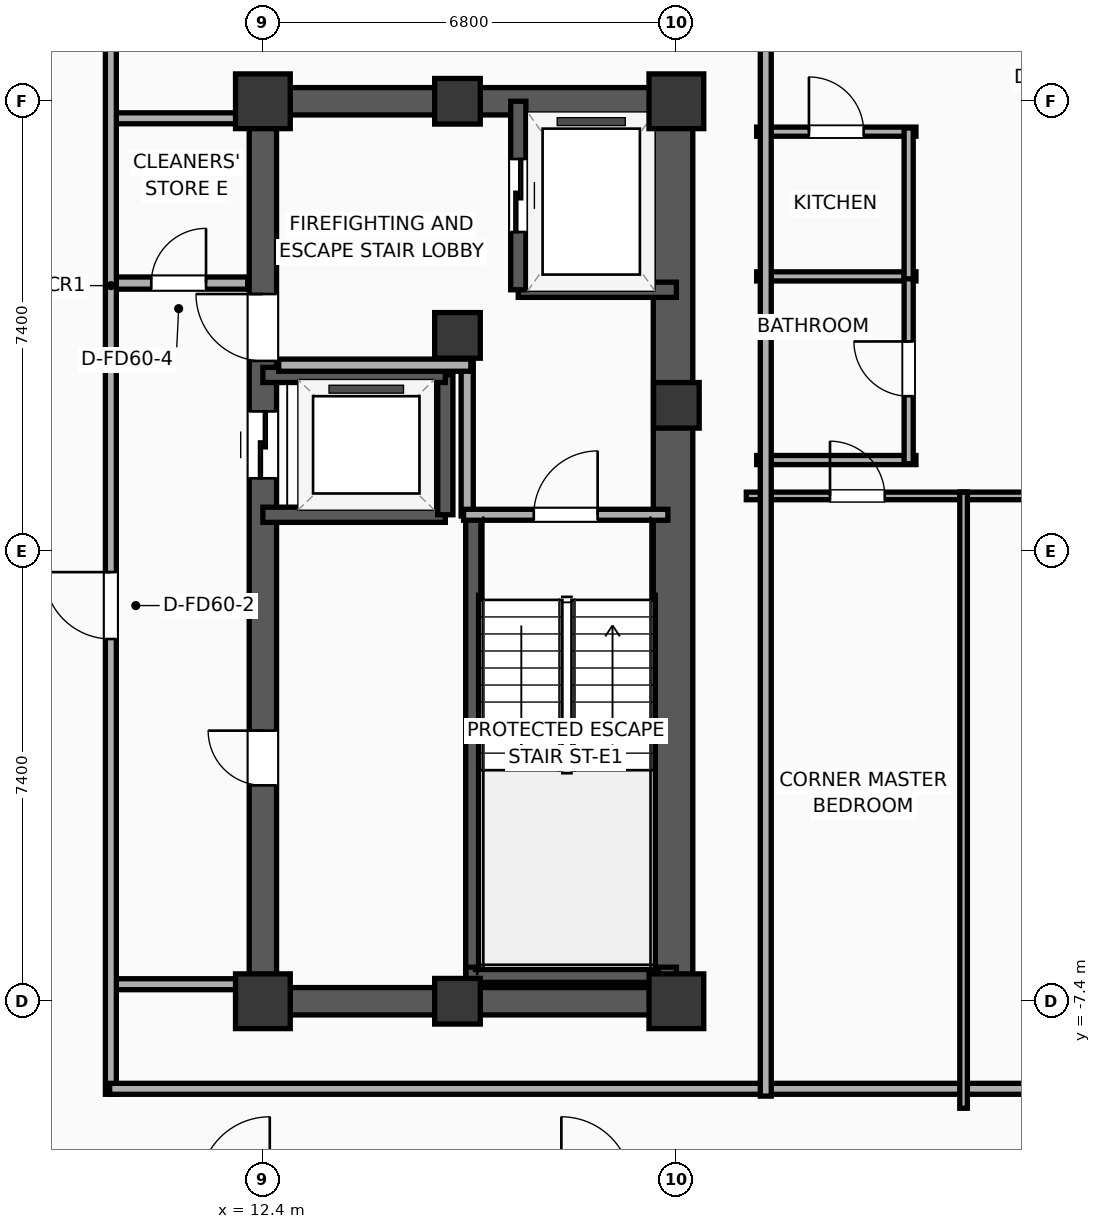
"""IFC4 building model, lengths in metres.
Left out: names, types, materials, properties, quantities, classifications, styles, units other than length and angle.
Written with IfcOpenShell. Run it as: python <this file> out.ifc"""

import sys

from ifc_helpers import new_model, si_unit, direction, frame, frame_2d, origin, origin_2d, place, context, subcontext, project, spatial, rectangle, extrude, element, fill, save


model = new_model("IFC4")
c1 = context("Model", 3, precision=1e-05, world=origin(), true_north=direction((0.0, 1.0)))
c2 = subcontext(c1, "Body", "Model", "MODEL_VIEW")
j1 = project(units=[si_unit("LENGTHUNIT", "METRE"), si_unit("PLANEANGLEUNIT", "RADIAN")], contexts=[c1])
p1 = place(None, origin())
s1 = spatial("IfcSite", under=j1, at=p1, CompositionType="ELEMENT")
p2 = place(p1, origin())
s2 = spatial("IfcBuilding", under=s1, at=p2, CompositionType="ELEMENT")
p3 = place(p2, frame((0.0, 0.0, 227.5)))
s3 = spatial("IfcBuildingStorey", under=s2, at=p3, CompositionType="ELEMENT", Elevation=227.5)
p4 = place(p3, frame((12.4, -7.4, 0.0), z_axis=(0.0, 0.0, 1.0), x_axis=(1.0, 0.0, 0.0)))
e1 = element("IfcColumn", 1, at=p4, inside=s3, PredefinedType="COLUMN", context=c2, shape_type="SweptSolid", body=[
    extrude(rectangle(XDim=0.9, YDim=0.9, at=origin_2d()), origin(), (0.0, 0.0, 1.0), 3.9),
])
p5 = place(p3, frame((15.6, 3.55, 0.0), z_axis=(0.0, 0.0, 1.0), x_axis=(1.0, 0.0, 0.0)))
e2 = element("IfcColumn", 2, at=p5, inside=s3, PredefinedType="COLUMN", context=c2, shape_type="SweptSolid", body=[
    extrude(rectangle(XDim=0.75, YDim=0.75, at=origin_2d()), origin(), (0.0, 0.0, 1.0), 3.9),
])
p6 = place(p3, frame((12.4, 7.4, 0.0), z_axis=(0.0, 0.0, 1.0), x_axis=(1.0, 0.0, 0.0)))
e3 = element("IfcColumn", 3, at=p6, inside=s3, PredefinedType="COLUMN", context=c2, shape_type="SweptSolid", body=[
    extrude(rectangle(XDim=0.9, YDim=0.9, at=origin_2d()), origin(), (0.0, 0.0, 1.0), 3.9),
])
for number, where, z_axis, x_axis in (
    (4, (15.6, -7.4, 0.0), (0.0, 0.0, 1.0), (1.0, 0.0, 0.0)),
    (5, (15.6, 7.4, 0.0), (0.0, 0.0, 1.0), (1.0, 0.0, 0.0)),
):
    element("IfcColumn", number, at=place(p3, frame(where, z_axis=z_axis, x_axis=x_axis)), inside=s3, PredefinedType="COLUMN", context=c2, shape_type="SweptSolid", body=[
        extrude(rectangle(XDim=0.75, YDim=0.75, at=origin_2d()), origin(), (0.0, 0.0, 1.0), 3.9),
    ])
p7 = place(p3, frame((19.2, -7.4, 0.0), z_axis=(0.0, 0.0, 1.0), x_axis=(1.0, 0.0, 0.0)))
e6 = element("IfcColumn", 6, at=p7, inside=s3, PredefinedType="COLUMN", context=c2, shape_type="SweptSolid", body=[
    extrude(rectangle(XDim=0.9, YDim=0.9, at=origin_2d()), origin(), (0.0, 0.0, 1.0), 3.9),
])
p8 = place(p3, frame((19.2, 2.4, 0.0), z_axis=(0.0, 0.0, 1.0), x_axis=(1.0, 0.0, 0.0)))
e7 = element("IfcColumn", 7, at=p8, inside=s3, PredefinedType="COLUMN", context=c2, shape_type="SweptSolid", body=[
    extrude(rectangle(XDim=0.75, YDim=0.75, at=origin_2d()), origin(), (0.0, 0.0, 1.0), 3.9),
])
p9 = place(p3, frame((19.2, 7.4, 0.0), z_axis=(0.0, 0.0, 1.0), x_axis=(1.0, 0.0, 0.0)))
e8 = element("IfcColumn", 8, at=p9, inside=s3, PredefinedType="COLUMN", context=c2, shape_type="SweptSolid", body=[
    extrude(rectangle(XDim=0.9, YDim=0.9, at=origin_2d()), origin(), (0.0, 0.0, 1.0), 3.9),
])
for number, where, z_axis, x_axis in (
    (9, (12.175, -7.4, 0.0), (0.0, 0.0, 1.0), (1.0, 0.0, 0.0)),
    (10, (12.175, 7.4, 0.0), (0.0, 0.0, 1.0), (1.0, 0.0, 0.0)),
):
    element("IfcWall", number, at=place(p3, frame(where, z_axis=z_axis, x_axis=x_axis)), inside=s3, PredefinedType="SHEAR", context=c2, shape_type="SweptSolid", body=[
        extrude(rectangle(XDim=7.25, YDim=0.45, at=frame_2d((3.625, 0.0))), origin(), (0.0, 0.0, 1.0), 3.65),
    ])
p10 = place(p3, frame((12.4, -7.4, 0.0), z_axis=(0.0, 0.0, 1.0), x_axis=(0.0, 1.0, 0.0)))
e11 = element("IfcWall", 11, at=p10, inside=s3, PredefinedType="SHEAR", context=c2, shape_type="SweptSolid", body=[
    extrude(rectangle(XDim=14.8, YDim=0.45, at=frame_2d((7.4, 0.0))), origin(), (0.0, 0.0, 1.0), 3.65),
])
p11 = place(p10, frame((8.6, 0.0, 0.0)))
e12 = element("IfcOpeningElement", 12, at=p11, cuts=e11, PredefinedType="OPENING", context=c2, shape_type="SweptSolid", body=[
    extrude(rectangle(XDim=1.1, YDim=2.05, at=frame_2d((0.55, 1.025))), frame((0.0, 0.235, 0.0), z_axis=(0.0, -1.0, 0.0), x_axis=(1.0, 0.0, 0.0)), (0.0, 0.0, 1.0), 0.47),
])
p12 = place(p10, frame((10.53, 0.0, 0.0)))
e13 = element("IfcOpeningElement", 13, at=p12, cuts=e11, PredefinedType="OPENING", context=c2, shape_type="SweptSolid", body=[
    extrude(rectangle(XDim=1.1, YDim=2.05, at=frame_2d((0.55, 1.025))), frame((0.0, 0.235, 0.0), z_axis=(0.0, -1.0, 0.0), x_axis=(1.0, 0.0, 0.0)), (0.0, 0.0, 1.0), 0.47),
])
p13 = place(p10, frame((3.55, 0.0, 0.0)))
e14 = element("IfcOpeningElement", 14, at=p13, cuts=e11, PredefinedType="OPENING", context=c2, shape_type="SweptSolid", body=[
    extrude(rectangle(XDim=0.9, YDim=2.05, at=frame_2d((0.45, 1.025))), frame((0.0, 0.235, 0.0), z_axis=(0.0, -1.0, 0.0), x_axis=(1.0, 0.0, 0.0)), (0.0, 0.0, 1.0), 0.47),
])
p14 = place(p3, frame((19.145, -7.4, 0.0), z_axis=(0.0, 0.0, 1.0), x_axis=(0.0, 1.0, 0.0)))
e15 = element("IfcWall", 15, at=p14, inside=s3, PredefinedType="SHEAR", context=c2, shape_type="SweptSolid", body=[
    extrude(rectangle(XDim=14.8, YDim=0.65, at=frame_2d((7.4, 0.0))), origin(), (0.0, 0.0, 1.0), 3.65),
])
p15 = place(p3, frame((15.86, -7.085, 0.0), z_axis=(0.0, 0.0, 1.0), x_axis=(0.0, 1.0, 0.0)))
e16 = element("IfcWall", 16, at=p15, inside=s3, PredefinedType="SOLIDWALL", context=c2, shape_type="SweptSolid", body=[
    extrude(rectangle(XDim=7.685, YDim=0.25, at=frame_2d((3.843, 0.0))), origin(), (0.0, 0.0, 1.0), 3.65),
])
p16 = place(p3, frame((15.74, -6.965, 0.0), z_axis=(0.0, 0.0, 1.0), x_axis=(1.0, 0.0, 0.0)))
e17 = element("IfcWall", 17, at=p16, inside=s3, PredefinedType="SOLIDWALL", context=c2, shape_type="SweptSolid", body=[
    extrude(rectangle(XDim=3.46, YDim=0.25, at=frame_2d((1.73, 0.0))), origin(), (0.0, 0.0, 1.0), 3.65),
])
p17 = place(p3, frame((16.6, 4.3, 0.0), z_axis=(0.0, 0.0, 1.0), x_axis=(1.0, 0.0, 0.0)))
e18 = element("IfcWall", 18, at=p17, inside=s3, PredefinedType="SOLIDWALL", context=c2, shape_type="SweptSolid", body=[
    extrude(rectangle(XDim=2.6, YDim=0.25, at=frame_2d((1.3, 0.0))), origin(), (0.0, 0.0, 1.0), 3.65),
])
p18 = place(p3, frame((16.6, 7.4, 0.0), z_axis=(0.0, 0.0, 1.0), x_axis=(0.0, -1.0, 0.0)))
e19 = element("IfcWall", 19, at=p18, inside=s3, PredefinedType="SOLIDWALL", context=c2, shape_type="SweptSolid", body=[
    extrude(rectangle(XDim=3.1, YDim=0.25, at=frame_2d((1.55, 0.0))), origin(), (0.0, 0.0, 1.0), 3.65),
])
p19 = place(p18, frame((0.95, 0.0, 0.0)))
e20 = element("IfcOpeningElement", 20, at=p19, cuts=e19, PredefinedType="OPENING", context=c2, shape_type="SweptSolid", body=[
    extrude(rectangle(XDim=1.2, YDim=2.05, at=frame_2d((0.6, 1.025))), frame((0.0, 0.135, 0.0), z_axis=(0.0, -1.0, 0.0), x_axis=(1.0, 0.0, 0.0)), (0.0, 0.0, 1.0), 0.27),
])
p20 = place(p3, frame((12.4, 0.6, 0.0), z_axis=(0.0, 0.0, 1.0), x_axis=(1.0, 0.0, 0.0)))
e21 = element("IfcWall", 21, at=p20, inside=s3, PredefinedType="SOLIDWALL", context=c2, shape_type="SweptSolid", body=[
    extrude(rectangle(XDim=3.0, YDim=0.25, at=frame_2d((1.5, 0.0))), origin(), (0.0, 0.0, 1.0), 3.65),
])
p21 = place(p3, frame((15.4, 0.6, 0.0), z_axis=(0.0, 0.0, 1.0), x_axis=(0.0, 1.0, 0.0)))
e22 = element("IfcWall", 22, at=p21, inside=s3, PredefinedType="SOLIDWALL", context=c2, shape_type="SweptSolid", body=[
    extrude(rectangle(XDim=2.3, YDim=0.25, at=frame_2d((1.15, 0.0))), origin(), (0.0, 0.0, 1.0), 3.65),
])
p22 = place(p3, frame((15.4, 2.9, 0.0), z_axis=(0.0, 0.0, 1.0), x_axis=(-1.0, 0.0, 0.0)))
e23 = element("IfcWall", 23, at=p22, inside=s3, PredefinedType="SOLIDWALL", context=c2, shape_type="SweptSolid", body=[
    extrude(rectangle(XDim=3.0, YDim=0.25, at=frame_2d((1.5, 0.0))), origin(), (0.0, 0.0, 1.0), 3.65),
])
p23 = place(p3, frame((15.76, 0.58, 0.0), z_axis=(0.0, 0.0, 1.0), x_axis=(0.0, 1.0, 0.0)))
e24 = element("IfcWall", 24, at=p23, inside=s3, PredefinedType="PARTITIONING", context=c2, shape_type="SweptSolid", body=[
    extrude(rectangle(XDim=2.52, YDim=0.2, at=frame_2d((1.26, 0.0))), origin(), (0.0, 0.0, 1.0), 3.65),
])
p24 = place(p3, frame((12.66, 3.06, 0.0), z_axis=(0.0, 0.0, 1.0), x_axis=(1.0, 0.0, 0.0)))
e25 = element("IfcWall", 25, at=p24, inside=s3, PredefinedType="PARTITIONING", context=c2, shape_type="SweptSolid", body=[
    extrude(rectangle(XDim=3.16, YDim=0.2, at=frame_2d((1.58, 0.0))), origin(), (0.0, 0.0, 1.0), 3.65),
])
p25 = place(p3, frame((15.7, 0.6, 0.0), z_axis=(0.0, 0.0, 1.0), x_axis=(1.0, 0.0, 0.0)))
e26 = element("IfcWall", 26, at=p25, inside=s3, PredefinedType="PARTITIONING", context=c2, shape_type="SweptSolid", body=[
    extrude(rectangle(XDim=3.36, YDim=0.18, at=frame_2d((1.68, 0.0))), origin(), (0.0, 0.0, 1.0), 3.65),
])
p26 = place(p25, frame((1.155, 0.0, 0.0)))
e27 = element("IfcOpeningElement", 27, at=p26, cuts=e26, PredefinedType="OPENING", context=c2, shape_type="SweptSolid", body=[
    extrude(rectangle(XDim=1.05, YDim=2.05, at=frame_2d((0.525, 1.025))), frame((0.0, 0.1, 0.0), z_axis=(0.0, -1.0, 0.0), x_axis=(1.0, 0.0, 0.0)), (0.0, 0.0, 1.0), 0.2),
])
p27 = place(p3, frame((9.88, 4.41, 0.0), z_axis=(0.0, 0.0, 1.0), x_axis=(1.0, 0.0, 0.0)))
e28 = element("IfcWall", 28, at=p27, inside=s3, PredefinedType="PARTITIONING", context=c2, shape_type="SweptSolid", body=[
    extrude(rectangle(XDim=2.27, YDim=0.2, at=frame_2d((1.135, 0.0))), origin(), (0.0, 0.0, 1.0), 3.65),
])
p28 = place(p27, frame((0.685, 0.0, 0.0)))
e29 = element("IfcOpeningElement", 29, at=p28, cuts=e28, PredefinedType="OPENING", context=c2, shape_type="SweptSolid", body=[
    extrude(rectangle(XDim=0.9, YDim=2.05, at=frame_2d((0.45, 1.025))), frame((0.0, 0.11, 0.0), z_axis=(0.0, -1.0, 0.0), x_axis=(1.0, 0.0, 0.0)), (0.0, 0.0, 1.0), 0.22),
])
for number, where, z_axis, x_axis in (
    (30, (9.88, 7.12, 0.0), (0.0, 0.0, 1.0), (1.0, 0.0, 0.0)),
    (31, (9.88, -7.12, 0.0), (0.0, 0.0, 1.0), (1.0, 0.0, 0.0)),
):
    element("IfcWall", number, at=place(p3, frame(where, z_axis=z_axis, x_axis=x_axis)), inside=s3, PredefinedType="PARTITIONING", context=c2, shape_type="SweptSolid", body=[
        extrude(rectangle(XDim=2.27, YDim=0.18, at=frame_2d((1.135, 0.0))), origin(), (0.0, 0.0, 1.0), 3.65),
    ])
p29 = place(p3, frame((9.9, -8.93, 0.0), z_axis=(0.0, 0.0, 1.0), x_axis=(0.0, 1.0, 0.0)))
e32 = element("IfcWall", 32, at=p29, inside=s3, PredefinedType="PARTITIONING", context=c2, shape_type="SweptSolid", body=[
    extrude(rectangle(XDim=17.86, YDim=0.18, at=frame_2d((8.93, 0.0))), origin(), (0.0, 0.0, 1.0), 3.65),
])
p30 = place(p29, frame((7.487, 0.0, 0.0)))
e33 = element("IfcOpeningElement", 33, at=p30, cuts=e32, PredefinedType="OPENING", context=c2, shape_type="SweptSolid", body=[
    extrude(rectangle(XDim=1.1, YDim=2.05, at=frame_2d((0.55, 1.025))), frame((0.0, 0.1, 0.0), z_axis=(0.0, -1.0, 0.0), x_axis=(1.0, 0.0, 0.0)), (0.0, 0.0, 1.0), 0.2),
])
p31 = place(p3, frame((9.88, -8.84, 0.0), z_axis=(0.0, 0.0, 1.0), x_axis=(1.0, 0.0, 0.0)))
e34 = element("IfcWall", 34, at=p31, inside=s3, PredefinedType="PARTITIONING", context=c2, shape_type="SweptSolid", body=[
    extrude(rectangle(XDim=20.35, YDim=0.18, at=frame_2d((10.175, 0.0))), origin(), (0.0, 0.0, 1.0), 3.65),
])
p32 = place(p3, frame((20.52, 6.9, 0.0), z_axis=(0.0, 0.0, 1.0), x_axis=(1.0, 0.0, 0.0)))
e35 = element("IfcWall", 35, at=p32, inside=s3, PredefinedType="PLUMBINGWALL", context=c2, shape_type="SweptSolid", body=[
    extrude(rectangle(XDim=2.62, YDim=0.15, at=frame_2d((1.31, 0.0))), origin(), (0.0, 0.0, 1.0), 3.65),
])
p33 = place(p32, frame((0.86, 0.0, 0.0)))
e36 = element("IfcOpeningElement", 36, at=p33, cuts=e35, PredefinedType="OPENING", context=c2, shape_type="SweptSolid", body=[
    extrude(rectangle(XDim=0.9, YDim=2.05, at=frame_2d((0.45, 1.025))), frame((0.0, 0.085, 0.0), z_axis=(0.0, -1.0, 0.0), x_axis=(1.0, 0.0, 0.0)), (0.0, 0.0, 1.0), 0.17),
])
for number, where, z_axis, x_axis in (
    (37, (20.52, 4.52, 0.0), (0.0, 0.0, 1.0), (1.0, 0.0, 0.0)),
    (38, (20.52, 1.5, 0.0), (0.0, 0.0, 1.0), (1.0, 0.0, 0.0)),
):
    element("IfcWall", number, at=place(p3, frame(where, z_axis=z_axis, x_axis=x_axis)), inside=s3, PredefinedType="PLUMBINGWALL", context=c2, shape_type="SweptSolid", body=[
        extrude(rectangle(XDim=2.62, YDim=0.15, at=frame_2d((1.31, 0.0))), origin(), (0.0, 0.0, 1.0), 3.65),
    ])
p34 = place(p3, frame((23.02, 1.44, 0.0), z_axis=(0.0, 0.0, 1.0), x_axis=(0.0, 1.0, 0.0)))
e39 = element("IfcWall", 39, at=p34, inside=s3, PredefinedType="PLUMBINGWALL", context=c2, shape_type="SweptSolid", body=[
    extrude(rectangle(XDim=3.12, YDim=0.15, at=frame_2d((1.56, 0.0))), origin(), (0.0, 0.0, 1.0), 3.65),
])
p35 = place(p34, frame((1.11, 0.0, 0.0)))
e40 = element("IfcOpeningElement", 40, at=p35, cuts=e39, PredefinedType="OPENING", context=c2, shape_type="SweptSolid", body=[
    extrude(rectangle(XDim=0.9, YDim=2.05, at=frame_2d((0.45, 1.025))), frame((0.0, 0.085, 0.0), z_axis=(0.0, -1.0, 0.0), x_axis=(1.0, 0.0, 0.0)), (0.0, 0.0, 1.0), 0.17),
])
p36 = place(p3, frame((23.02, 4.48, 0.0), z_axis=(0.0, 0.0, 1.0), x_axis=(0.0, 1.0, 0.0)))
e41 = element("IfcWall", 41, at=p36, inside=s3, PredefinedType="PLUMBINGWALL", context=c2, shape_type="SweptSolid", body=[
    extrude(rectangle(XDim=2.48, YDim=0.15, at=frame_2d((1.24, 0.0))), origin(), (0.0, 0.0, 1.0), 3.65),
])
p37 = place(p3, frame((20.35, 0.91, 0.0), z_axis=(0.0, 0.0, 1.0), x_axis=(1.0, 0.0, 0.0)))
e42 = element("IfcWall", 42, at=p37, inside=s3, PredefinedType="PARTITIONING", context=c2, shape_type="SweptSolid", body=[
    extrude(rectangle(XDim=3.635, YDim=0.125, at=frame_2d((1.818, 0.0))), origin(), (0.0, 0.0, 1.0), 3.65),
])
p38 = place(p37, frame((1.376, 0.0, 0.0)))
e43 = element("IfcOpeningElement", 43, at=p38, cuts=e42, PredefinedType="OPENING", context=c2, shape_type="SweptSolid", body=[
    extrude(rectangle(XDim=0.9, YDim=2.05, at=frame_2d((0.45, 1.025))), frame((0.0, 0.073, 0.0), z_axis=(0.0, -1.0, 0.0), x_axis=(1.0, 0.0, 0.0)), (0.0, 0.0, 1.0), 0.145),
])
p39 = place(p3, frame((23.861, 0.91, 0.0), z_axis=(0.0, 0.0, 1.0), x_axis=(1.0, 0.0, 0.0)))
e44 = element("IfcWall", 44, at=p39, inside=s3, PredefinedType="PARTITIONING", context=c2, shape_type="SweptSolid", body=[
    extrude(rectangle(XDim=3.282, YDim=0.125, at=frame_2d((1.641, 0.0))), origin(), (0.0, 0.0, 1.0), 3.65),
])
p40 = place(p39, frame((1.191, 0.0, 0.0)))
e45 = element("IfcOpeningElement", 45, at=p40, cuts=e44, PredefinedType="OPENING", context=c2, shape_type="SweptSolid", body=[
    extrude(rectangle(XDim=0.9, YDim=2.05, at=frame_2d((0.45, 1.025))), frame((0.0, 0.073, 0.0), z_axis=(0.0, -1.0, 0.0), x_axis=(1.0, 0.0, 0.0)), (0.0, 0.0, 1.0), 0.145),
])
p41 = place(p3, frame((23.923, -9.16, 0.0), z_axis=(0.0, 0.0, 1.0), x_axis=(0.0, 1.0, 0.0)))
e46 = element("IfcWall", 46, at=p41, inside=s3, PredefinedType="PARTITIONING", context=c2, shape_type="SweptSolid", body=[
    extrude(rectangle(XDim=10.13, YDim=0.125, at=frame_2d((5.065, 0.0))), origin(), (0.0, 0.0, 1.0), 3.65),
])
p42 = place(p3, frame((20.67, -8.96, 0.0), z_axis=(0.0, 0.0, 1.0), x_axis=(0.0, 1.0, 0.0)))
e47 = element("IfcWall", 47, at=p42, inside=s3, PredefinedType="PARTITIONING", context=c2, shape_type="SweptSolid", body=[
    extrude(rectangle(XDim=17.92, YDim=0.18, at=frame_2d((8.96, 0.0))), origin(), (0.0, 0.0, 1.0), 3.65),
])
p43 = place(p19, origin())
e48 = element("IfcDoor", 48, at=p43, inside=s3, OperationType="SLIDING_TO_LEFT", PredefinedType="DOOR", context=c2, shape_type="SweptSolid", body=[
    extrude(rectangle(XDim=1.2, YDim=2.05, at=frame_2d((0.6, 1.025))), frame((0.0, 0.025, 0.0), z_axis=(0.0, -1.0, 0.0), x_axis=(1.0, 0.0, 0.0)), (0.0, 0.0, 1.0), 0.05),
])
fill(e20, e48)
p44 = place(p11, origin())
e49 = element("IfcDoor", 49, at=p44, inside=s3, OperationType="SLIDING_TO_LEFT", PredefinedType="DOOR", context=c2, shape_type="SweptSolid", body=[
    extrude(rectangle(XDim=1.1, YDim=2.05, at=frame_2d((0.55, 1.025))), frame((0.0, 0.025, 0.0), z_axis=(0.0, -1.0, 0.0), x_axis=(1.0, 0.0, 0.0)), (0.0, 0.0, 1.0), 0.05),
])
fill(e12, e49)
p45 = place(p26, origin())
e50 = element("IfcDoor", 50, at=p45, inside=s3, OperationType="SINGLE_SWING_RIGHT", PredefinedType="DOOR", context=c2, shape_type="SweptSolid", body=[
    extrude(rectangle(XDim=1.05, YDim=2.05, at=frame_2d((0.525, 1.025))), frame((0.0, 0.025, 0.0), z_axis=(0.0, -1.0, 0.0), x_axis=(1.0, 0.0, 0.0)), (0.0, 0.0, 1.0), 0.05),
])
fill(e27, e50)
p46 = place(p28, origin())
e51 = element("IfcDoor", 51, at=p46, inside=s3, OperationType="SINGLE_SWING_RIGHT", PredefinedType="DOOR", context=c2, shape_type="SweptSolid", body=[
    extrude(rectangle(XDim=0.9, YDim=2.05, at=frame_2d((0.45, 1.025))), frame((0.0, 0.025, 0.0), z_axis=(0.0, -1.0, 0.0), x_axis=(1.0, 0.0, 0.0)), (0.0, 0.0, 1.0), 0.05),
])
fill(e29, e51)
p47 = place(p30, origin())
e52 = element("IfcDoor", 52, at=p47, inside=s3, OperationType="SINGLE_SWING_RIGHT", PredefinedType="DOOR", context=c2, shape_type="SweptSolid", body=[
    extrude(rectangle(XDim=1.1, YDim=2.05, at=frame_2d((0.55, 1.025))), frame((0.0, 0.025, 0.0), z_axis=(0.0, -1.0, 0.0), x_axis=(1.0, 0.0, 0.0)), (0.0, 0.0, 1.0), 0.05),
])
fill(e33, e52)
p48 = place(p33, origin())
e53 = element("IfcDoor", 53, at=p48, inside=s3, OperationType="SINGLE_SWING_LEFT", PredefinedType="DOOR", context=c2, shape_type="SweptSolid", body=[
    extrude(rectangle(XDim=0.9, YDim=2.05, at=frame_2d((0.45, 1.025))), frame((0.0, 0.025, 0.0), z_axis=(0.0, -1.0, 0.0), x_axis=(1.0, 0.0, 0.0)), (0.0, 0.0, 1.0), 0.05),
])
fill(e36, e53)
p49 = place(p35, origin())
e54 = element("IfcDoor", 54, at=p49, inside=s3, OperationType="SINGLE_SWING_RIGHT", PredefinedType="DOOR", context=c2, shape_type="SweptSolid", body=[
    extrude(rectangle(XDim=0.9, YDim=2.05, at=frame_2d((0.45, 1.025))), frame((0.0, 0.025, 0.0), z_axis=(0.0, -1.0, 0.0), x_axis=(1.0, 0.0, 0.0)), (0.0, 0.0, 1.0), 0.05),
])
fill(e40, e54)
p50 = place(p38, origin())
e55 = element("IfcDoor", 55, at=p50, inside=s3, OperationType="SINGLE_SWING_LEFT", PredefinedType="DOOR", context=c2, shape_type="SweptSolid", body=[
    extrude(rectangle(XDim=0.9, YDim=2.05, at=frame_2d((0.45, 1.025))), frame((0.0, 0.025, 0.0), z_axis=(0.0, -1.0, 0.0), x_axis=(1.0, 0.0, 0.0)), (0.0, 0.0, 1.0), 0.05),
])
fill(e43, e55)
p51 = place(p12, origin())
e56 = element("IfcDoor", 56, at=p51, inside=s3, OperationType="SINGLE_SWING_RIGHT", PredefinedType="DOOR", context=c2, shape_type="SweptSolid", body=[
    extrude(rectangle(XDim=1.1, YDim=2.05, at=frame_2d((0.55, 1.025))), frame((0.0, 0.025, 0.0), z_axis=(0.0, -1.0, 0.0), x_axis=(1.0, 0.0, 0.0)), (0.0, 0.0, 1.0), 0.05),
])
fill(e13, e56)
p52 = place(p13, origin())
e57 = element("IfcDoor", 57, at=p52, inside=s3, OperationType="SINGLE_SWING_RIGHT", PredefinedType="DOOR", context=c2, shape_type="SweptSolid", body=[
    extrude(rectangle(XDim=0.9, YDim=2.05, at=frame_2d((0.45, 1.025))), frame((0.0, 0.025, 0.0), z_axis=(0.0, -1.0, 0.0), x_axis=(1.0, 0.0, 0.0)), (0.0, 0.0, 1.0), 0.05),
])
fill(e14, e57)
save(model, sys.argv[1])
